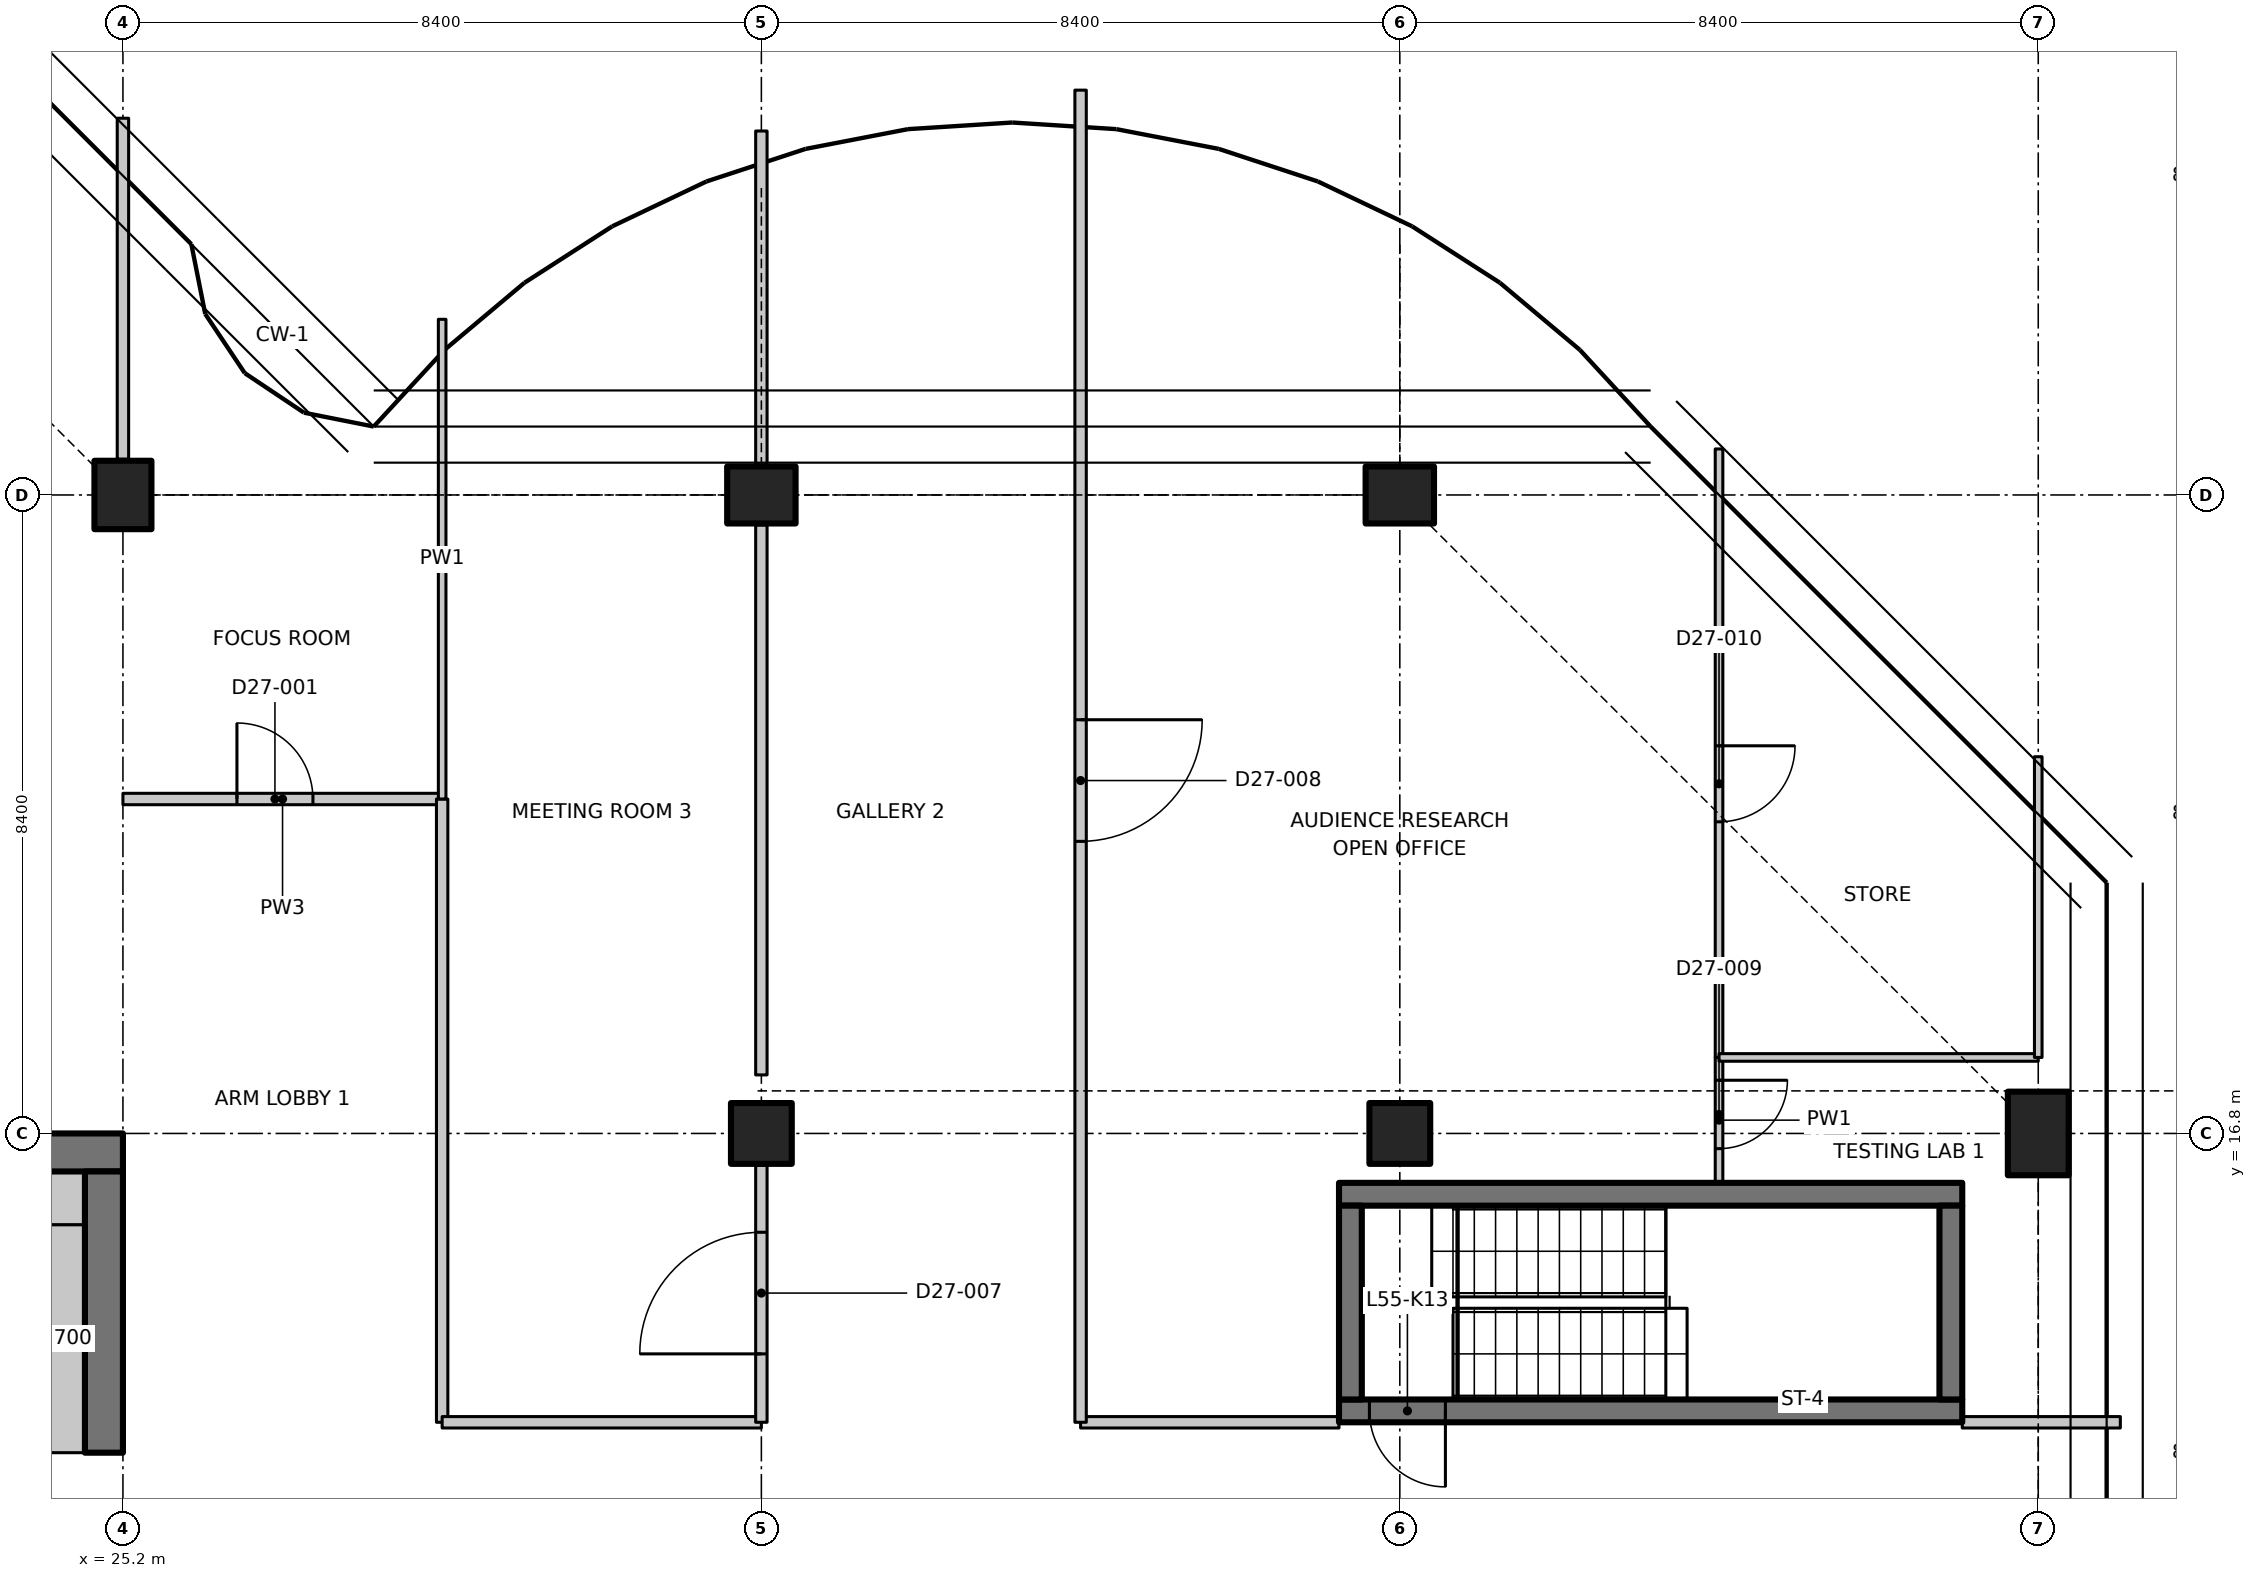
"""IFC4 building model, lengths in metres.
Left out: names, types, materials, properties, quantities, classifications, styles, units other than length and angle.
Written with IfcOpenShell. Run it as: python <this file> out.ifc"""

import sys

from ifc_helpers import new_model, si_unit, direction, frame, frame_2d, origin, origin_2d, place, context, subcontext, project, spatial, polyline, rectangle, outline, extrude, element, fill, save


model = new_model("IFC4")
c1 = context("Model", 3, precision=1e-05, world=origin(), true_north=direction((0.0, 1.0)))
c2 = subcontext(c1, "Body", "Model", "MODEL_VIEW")
j1 = project(units=[si_unit("LENGTHUNIT", "METRE"), si_unit("PLANEANGLEUNIT", "RADIAN")], contexts=[c1])
p1 = place(None, origin())
s1 = spatial("IfcSite", under=j1, at=p1, CompositionType="ELEMENT")
p2 = place(p1, origin())
s2 = spatial("IfcBuilding", under=s1, at=p2, CompositionType="ELEMENT")
p3 = place(p2, frame((0.0, 0.0, 219.3)))
s3 = spatial("IfcBuildingStorey", under=s2, at=p3, CompositionType="ELEMENT", Elevation=219.3)
p4 = place(p3, frame((25.2, 25.2, 0.0), z_axis=(0.0, 0.0, 1.0), x_axis=(1.0, 0.0, 0.0)))
e1 = element("IfcColumn", 1, at=p4, inside=s3, PredefinedType="COLUMN", context=c2, shape_type="SweptSolid", body=[
    extrude(rectangle(XDim=0.75, YDim=0.9, at=origin_2d()), origin(), (0.0, 0.0, 1.0), 3.35),
])
p5 = place(p3, frame((33.6, 16.8, 0.0), z_axis=(0.0, 0.0, 1.0), x_axis=(1.0, 0.0, 0.0)))
e2 = element("IfcColumn", 2, at=p5, inside=s3, PredefinedType="COLUMN", context=c2, shape_type="SweptSolid", body=[
    extrude(rectangle(XDim=0.8, YDim=0.8, at=origin_2d()), origin(), (0.0, 0.0, 1.0), 3.35),
])
p6 = place(p3, frame((33.6, 25.2, 0.0), z_axis=(0.0, 0.0, 1.0), x_axis=(0.0, 1.0, 0.0)))
e3 = element("IfcColumn", 3, at=p6, inside=s3, PredefinedType="COLUMN", context=c2, shape_type="SweptSolid", body=[
    extrude(rectangle(XDim=0.75, YDim=0.9, at=origin_2d()), origin(), (0.0, 0.0, 1.0), 3.35),
])
p7 = place(p3, frame((42.0, 16.8, 0.0), z_axis=(0.0, 0.0, 1.0), x_axis=(1.0, 0.0, 0.0)))
e4 = element("IfcColumn", 4, at=p7, inside=s3, PredefinedType="COLUMN", context=c2, shape_type="SweptSolid", body=[
    extrude(rectangle(XDim=0.8, YDim=0.8, at=origin_2d()), origin(), (0.0, 0.0, 1.0), 3.35),
])
p8 = place(p3, frame((42.0, 25.2, 0.0), z_axis=(0.0, 0.0, 1.0), x_axis=(0.0, 1.0, 0.0)))
e5 = element("IfcColumn", 5, at=p8, inside=s3, PredefinedType="COLUMN", context=c2, shape_type="SweptSolid", body=[
    extrude(rectangle(XDim=0.75, YDim=0.9, at=origin_2d()), origin(), (0.0, 0.0, 1.0), 3.35),
])
p9 = place(p3, frame((50.4, 16.8, 0.0), z_axis=(0.0, 0.0, 1.0), x_axis=(1.0, 0.0, 0.0)))
e6 = element("IfcColumn", 6, at=p9, inside=s3, PredefinedType="COLUMN", context=c2, shape_type="SweptSolid", body=[
    extrude(rectangle(XDim=0.8, YDim=1.1, at=origin_2d()), origin(), (0.0, 0.0, 1.0), 3.35),
])
p10 = place(p3, frame((23.8, 16.55, 0.0), z_axis=(0.0, 0.0, 1.0), x_axis=(1.0, 0.0, 0.0)))
e7 = element("IfcWall", 7, at=p10, inside=s3, PredefinedType="SHEAR", context=c2, shape_type="SweptSolid", body=[
    extrude(rectangle(XDim=1.4, YDim=0.5, at=frame_2d((0.7, 0.0))), origin(), (0.0, 0.0, 1.0), 3.35),
])
p11 = place(p3, frame((24.95, 12.6, 0.0), z_axis=(0.0, 0.0, 1.0), x_axis=(0.0, 1.0, 0.0)))
e8 = element("IfcWall", 8, at=p11, inside=s3, PredefinedType="SHEAR", context=c2, shape_type="SweptSolid", body=[
    extrude(rectangle(XDim=3.7, YDim=0.5, at=frame_2d((1.85, 0.0))), origin(), (0.0, 0.0, 1.0), 3.35),
])
p12 = place(p3, frame((24.35, 12.6, 0.0), z_axis=(0.0, 0.0, 1.0), x_axis=(0.0, 1.0, 0.0)))
e9 = element("IfcWall", 9, at=p12, inside=s3, PredefinedType="PARTITIONING", context=c2, shape_type="SweptSolid", body=[
    extrude(rectangle(XDim=3.0, YDim=0.7, at=frame_2d((1.5, 0.0))), origin(), (0.0, 0.0, 1.0), 3.35),
])
p13 = place(p3, frame((23.8, 15.95, 0.0), z_axis=(0.0, 0.0, 1.0), x_axis=(1.0, 0.0, 0.0)))
e10 = element("IfcWall", 10, at=p13, inside=s3, PredefinedType="PARTITIONING", context=c2, shape_type="SweptSolid", body=[
    extrude(rectangle(XDim=0.9, YDim=0.7, at=frame_2d((0.45, 0.0))), origin(), (0.0, 0.0, 1.0), 3.35),
])
p14 = place(p3, frame((49.4, 13.15, 0.0), z_axis=(0.0, 0.0, 1.0), x_axis=(-1.0, 0.0, 0.0)))
e11 = element("IfcWall", 11, at=p14, inside=s3, PredefinedType="SHEAR", context=c2, shape_type="SweptSolid", body=[
    extrude(rectangle(XDim=8.2, YDim=0.3, at=frame_2d((4.1, 0.0))), origin(), (0.0, 0.0, 1.0), 3.35),
])
p15 = place(p14, frame((6.8, 0.0, 0.0)))
e12 = element("IfcOpeningElement", 12, at=p15, cuts=e11, PredefinedType="OPENING", context=c2, shape_type="SweptSolid", body=[
    extrude(rectangle(XDim=1.0, YDim=2.1, at=frame_2d((0.5, 1.05))), frame((0.0, 0.16, 0.0), z_axis=(0.0, -1.0, 0.0), x_axis=(1.0, 0.0, 0.0)), (0.0, 0.0, 1.0), 0.32),
])
p16 = place(p3, frame((41.2, 16.0, 0.0), z_axis=(0.0, 0.0, 1.0), x_axis=(1.0, 0.0, 0.0)))
e13 = element("IfcWall", 13, at=p16, inside=s3, PredefinedType="SHEAR", context=c2, shape_type="SweptSolid", body=[
    extrude(rectangle(XDim=8.2, YDim=0.3, at=frame_2d((4.1, 0.0))), origin(), (0.0, 0.0, 1.0), 3.35),
])
for number, where, z_axis, x_axis in (
    (14, (41.35, 13.3, 0.0), (0.0, 0.0, 1.0), (0.0, 1.0, 0.0)),
    (15, (49.25, 13.3, 0.0), (0.0, 0.0, 1.0), (0.0, 1.0, 0.0)),
):
    element("IfcWall", number, at=place(p3, frame(where, z_axis=z_axis, x_axis=x_axis)), inside=s3, PredefinedType="SHEAR", context=c2, shape_type="SweptSolid", body=[
        extrude(rectangle(XDim=2.55, YDim=0.3, at=frame_2d((1.275, 0.0))), origin(), (0.0, 0.0, 1.0), 3.35),
    ])
p17 = place(p3, frame((25.2, 21.2, 0.0), z_axis=(0.0, 0.0, 1.0), x_axis=(1.0, 0.0, 0.0)))
e16 = element("IfcWall", 16, at=p17, inside=s3, PredefinedType="PARTITIONING", context=c2, shape_type="SweptSolid", body=[
    extrude(rectangle(XDim=4.2, YDim=0.15, at=frame_2d((2.1, 0.0))), origin(), (0.0, 0.0, 1.0), 3.33),
])
p18 = place(p17, frame((1.5, 0.0, 0.0)))
e17 = element("IfcOpeningElement", 17, at=p18, cuts=e16, PredefinedType="OPENING", context=c2, shape_type="SweptSolid", body=[
    extrude(rectangle(XDim=1.0, YDim=2.1, at=frame_2d((0.5, 1.05))), frame((0.0, 0.085, 0.0), z_axis=(0.0, -1.0, 0.0), x_axis=(1.0, 0.0, 0.0)), (0.0, 0.0, 1.0), 0.17),
])
p19 = place(p3, frame((29.4, 21.2, 0.0), z_axis=(0.0, 0.0, 1.0), x_axis=(0.0, -1.0, 0.0)))
e18 = element("IfcWall", 18, at=p19, inside=s3, PredefinedType="PARTITIONING", context=c2, shape_type="SweptSolid", body=[
    extrude(rectangle(XDim=8.2, YDim=0.15, at=frame_2d((4.1, 0.0))), origin(), (0.0, 0.0, 1.0), 3.33),
])
p20 = place(p3, frame((29.4, 27.511, 0.0), z_axis=(0.0, 0.0, 1.0), x_axis=(0.0, -1.0, 0.0)))
e19 = element("IfcWall", 19, at=p20, inside=s3, PredefinedType="PARTITIONING", context=c2, shape_type="SweptSolid", body=[
    extrude(outline(polyline([(0.0, 0.0), (6.311, 0.0), (6.311, 3.33), (2.761, 3.33), (2.759, 2.98), (1.863, 2.98), (1.861, 3.33), (0.236, 3.33), (0.0, 3.33), (0.0, 0.0)])), frame((0.0, 0.05, 0.0), z_axis=(0.0, -1.0, 0.0), x_axis=(1.0, 0.0, 0.0)), (0.0, 0.0, 1.0), 0.1),
])
p21 = place(p3, frame((25.2, 25.67, 0.0), z_axis=(0.0, 0.0, 1.0), x_axis=(0.0, 1.0, 0.0)))
e20 = element("IfcWall", 20, at=p21, inside=s3, PredefinedType="PARTITIONING", context=c2, shape_type="SweptSolid", body=[
    extrude(rectangle(XDim=4.487, YDim=0.15, at=frame_2d((2.243, 0.0))), origin(), (0.0, 0.0, 1.0), 2.98),
])
p22 = place(p3, frame((29.4, 13.0, 0.0), z_axis=(0.0, 0.0, 1.0), x_axis=(1.0, 0.0, 0.0)))
e21 = element("IfcWall", 21, at=p22, inside=s3, PredefinedType="PARTITIONING", context=c2, shape_type="SweptSolid", body=[
    extrude(rectangle(XDim=4.2, YDim=0.15, at=frame_2d((2.1, 0.0))), origin(), (0.0, 0.0, 1.0), 3.33),
])
p23 = place(p3, frame((37.8, 13.0, 0.0), z_axis=(0.0, 0.0, 1.0), x_axis=(1.0, 0.0, 0.0)))
e22 = element("IfcWall", 22, at=p23, inside=s3, PredefinedType="PARTITIONING", context=c2, shape_type="SweptSolid", body=[
    extrude(rectangle(XDim=3.4, YDim=0.15, at=frame_2d((1.7, 0.0))), origin(), (0.0, 0.0, 1.0), 3.33),
])
p24 = place(p3, frame((49.4, 13.0, 0.0), z_axis=(0.0, 0.0, 1.0), x_axis=(1.0, 0.0, 0.0)))
e23 = element("IfcWall", 23, at=p24, inside=s3, PredefinedType="PARTITIONING", context=c2, shape_type="SweptSolid", body=[
    extrude(rectangle(XDim=2.08, YDim=0.15, at=frame_2d((1.04, 0.0))), origin(), (0.0, 0.0, 1.0), 2.98),
])
p25 = place(p3, frame((33.6, 13.0, 0.0), z_axis=(0.0, 0.0, 1.0), x_axis=(0.0, 1.0, 0.0)))
e24 = element("IfcWall", 24, at=p25, inside=s3, PredefinedType="PARTITIONING", context=c2, shape_type="SweptSolid", body=[
    extrude(rectangle(XDim=3.38, YDim=0.15, at=frame_2d((1.69, 0.0))), origin(), (0.0, 0.0, 1.0), 3.33),
])
p26 = place(p25, frame((0.9, 0.0, 0.0)))
e25 = element("IfcOpeningElement", 25, at=p26, cuts=e24, PredefinedType="OPENING", context=c2, shape_type="SweptSolid", body=[
    extrude(rectangle(XDim=1.6, YDim=2.1, at=frame_2d((0.8, 1.05))), frame((0.0, 0.085, 0.0), z_axis=(0.0, -1.0, 0.0), x_axis=(1.0, 0.0, 0.0)), (0.0, 0.0, 1.0), 0.17),
])
p27 = place(p3, frame((33.6, 17.57, 0.0), z_axis=(0.0, 0.0, 1.0), x_axis=(0.0, 1.0, 0.0)))
e26 = element("IfcWall", 26, at=p27, inside=s3, PredefinedType="PARTITIONING", context=c2, shape_type="SweptSolid", body=[
    extrude(outline(polyline([(0.0, 0.0), (7.235, 0.0), (7.235, 2.98), (7.182, 2.98), (7.18, 3.33), (0.0, 3.33), (0.0, 0.0)])), frame((0.0, 0.075, 0.0), z_axis=(0.0, -1.0, 0.0), x_axis=(1.0, 0.0, 0.0)), (0.0, 0.0, 1.0), 0.15),
])
p28 = place(p3, frame((33.6, 25.595, 0.0), z_axis=(0.0, 0.0, 1.0), x_axis=(0.0, 1.0, 0.0)))
e27 = element("IfcWall", 27, at=p28, inside=s3, PredefinedType="PARTITIONING", context=c2, shape_type="SweptSolid", body=[
    extrude(rectangle(XDim=4.393, YDim=0.15, at=frame_2d((2.197, 0.0))), origin(), (0.0, 0.0, 1.0), 2.98),
])
p29 = place(p3, frame((37.8, 30.526, 0.0), z_axis=(0.0, 0.0, 1.0), x_axis=(0.0, -1.0, 0.0)))
e28 = element("IfcWall", 28, at=p29, inside=s3, PredefinedType="PARTITIONING", context=c2, shape_type="SweptSolid", body=[
    extrude(outline(polyline([(0.0, 0.0), (17.526, 0.0), (17.526, 3.33), (5.776, 3.33), (5.774, 2.98), (4.878, 2.98), (4.876, 3.33), (0.283, 3.33), (0.0, 3.33), (0.0, 0.0)])), frame((0.0, 0.075, 0.0), z_axis=(0.0, -1.0, 0.0), x_axis=(1.0, 0.0, 0.0)), (0.0, 0.0, 1.0), 0.15),
])
p30 = place(p29, frame((8.283, 0.0, 0.0)))
e29 = element("IfcOpeningElement", 29, at=p30, cuts=e28, PredefinedType="OPENING", context=c2, shape_type="SweptSolid", body=[
    extrude(rectangle(XDim=1.6, YDim=2.1, at=frame_2d((0.8, 1.05))), frame((0.0, 0.085, 0.0), z_axis=(0.0, -1.0, 0.0), x_axis=(1.0, 0.0, 0.0)), (0.0, 0.0, 1.0), 0.17),
])
p31 = place(p3, frame((46.2, 17.8, 0.0), z_axis=(0.0, 0.0, 1.0), x_axis=(0.0, -1.0, 0.0)))
e30 = element("IfcWall", 30, at=p31, inside=s3, PredefinedType="PARTITIONING", context=c2, shape_type="SweptSolid", body=[
    extrude(rectangle(XDim=1.65, YDim=0.1, at=frame_2d((0.825, 0.0))), origin(), (0.0, 0.0, 1.0), 2.192),
])
p32 = place(p31, frame((0.3, 0.0, 0.0)))
e31 = element("IfcOpeningElement", 31, at=p32, cuts=e30, PredefinedType="OPENING", context=c2, shape_type="SweptSolid", body=[
    extrude(rectangle(XDim=0.9, YDim=2.1, at=frame_2d((0.45, 1.05))), frame((0.0, 0.06, 0.0), z_axis=(0.0, -1.0, 0.0), x_axis=(1.0, 0.0, 0.0)), (0.0, 0.0, 1.0), 0.12),
])
p33 = place(p3, frame((46.2, 25.805, 0.0), z_axis=(0.0, 0.0, 1.0), x_axis=(0.0, -1.0, 0.0)))
e32 = element("IfcWall", 32, at=p33, inside=s3, PredefinedType="PARTITIONING", context=c2, shape_type="SweptSolid", body=[
    extrude(outline(polyline([(0.0, 0.0), (8.005, 0.0), (8.005, 3.33), (5.471, 3.33), (5.469, 2.98), (4.142, 2.98), (4.14, 3.33), (0.406, 3.33), (0.0, 3.33), (0.0, 0.0)])), frame((0.0, 0.05, 0.0), z_axis=(0.0, -1.0, 0.0), x_axis=(1.0, 0.0, 0.0)), (0.0, 0.0, 1.0), 0.1),
])
p34 = place(p33, frame((3.906, 0.0, 0.0)))
e33 = element("IfcOpeningElement", 33, at=p34, cuts=e32, PredefinedType="OPENING", context=c2, shape_type="SweptSolid", body=[
    extrude(rectangle(XDim=1.0, YDim=2.1, at=frame_2d((0.5, 1.05))), frame((0.0, 0.06, 0.0), z_axis=(0.0, -1.0, 0.0), x_axis=(1.0, 0.0, 0.0)), (0.0, 0.0, 1.0), 0.12),
])
p35 = place(p3, frame((46.2, 17.8, 0.0), z_axis=(0.0, 0.0, 1.0), x_axis=(1.0, 0.0, 0.0)))
e34 = element("IfcWall", 34, at=p35, inside=s3, PredefinedType="PARTITIONING", context=c2, shape_type="SweptSolid", body=[
    extrude(rectangle(XDim=4.2, YDim=0.1, at=frame_2d((2.1, 0.0))), origin(), (0.0, 0.0, 1.0), 2.98),
])
p36 = place(p3, frame((50.4, 17.8, 0.0), z_axis=(0.0, 0.0, 1.0), x_axis=(0.0, 1.0, 0.0)))
e35 = element("IfcWall", 35, at=p36, inside=s3, PredefinedType="PARTITIONING", context=c2, shape_type="SweptSolid", body=[
    extrude(rectangle(XDim=3.956, YDim=0.1, at=frame_2d((1.978, 0.0))), origin(), (0.0, 0.0, 1.0), 3.33),
])
p37 = place(p15, origin())
e36 = element("IfcDoor", 36, at=p37, inside=s3, OperationType="SINGLE_SWING_LEFT", PredefinedType="DOOR", context=c2, shape_type="SweptSolid", body=[
    extrude(rectangle(XDim=1.0, YDim=2.1, at=frame_2d((0.5, 1.05))), frame((0.0, 0.025, 0.0), z_axis=(0.0, -1.0, 0.0), x_axis=(1.0, 0.0, 0.0)), (0.0, 0.0, 1.0), 0.05),
])
fill(e12, e36)
p38 = place(p18, origin())
e37 = element("IfcDoor", 37, at=p38, inside=s3, OperationType="SINGLE_SWING_LEFT", PredefinedType="DOOR", context=c2, shape_type="SweptSolid", body=[
    extrude(rectangle(XDim=1.0, YDim=2.1, at=frame_2d((0.5, 1.05))), frame((0.0, 0.025, 0.0), z_axis=(0.0, -1.0, 0.0), x_axis=(1.0, 0.0, 0.0)), (0.0, 0.0, 1.0), 0.05),
])
fill(e17, e37)
p39 = place(p26, origin())
e38 = element("IfcDoor", 38, at=p39, inside=s3, OperationType="DOUBLE_DOOR_SINGLE_SWING", PredefinedType="DOOR", context=c2, shape_type="SweptSolid", body=[
    extrude(rectangle(XDim=1.6, YDim=2.1, at=frame_2d((0.8, 1.05))), frame((0.0, 0.025, 0.0), z_axis=(0.0, -1.0, 0.0), x_axis=(1.0, 0.0, 0.0)), (0.0, 0.0, 1.0), 0.05),
])
fill(e25, e38)
p40 = place(p30, origin())
e39 = element("IfcDoor", 39, at=p40, inside=s3, OperationType="DOUBLE_DOOR_SINGLE_SWING", PredefinedType="DOOR", context=c2, shape_type="SweptSolid", body=[
    extrude(rectangle(XDim=1.6, YDim=2.1, at=frame_2d((0.8, 1.05))), frame((0.0, 0.025, 0.0), z_axis=(0.0, -1.0, 0.0), x_axis=(1.0, 0.0, 0.0)), (0.0, 0.0, 1.0), 0.05),
])
fill(e29, e39)
p41 = place(p32, origin())
e40 = element("IfcDoor", 40, at=p41, inside=s3, OperationType="SINGLE_SWING_LEFT", PredefinedType="DOOR", context=c2, shape_type="SweptSolid", body=[
    extrude(rectangle(XDim=0.9, YDim=2.1, at=frame_2d((0.45, 1.05))), frame((0.0, 0.025, 0.0), z_axis=(0.0, -1.0, 0.0), x_axis=(1.0, 0.0, 0.0)), (0.0, 0.0, 1.0), 0.05),
])
fill(e31, e40)
p42 = place(p34, origin())
e41 = element("IfcDoor", 41, at=p42, inside=s3, OperationType="SINGLE_SWING_LEFT", PredefinedType="DOOR", context=c2, shape_type="SweptSolid", body=[
    extrude(rectangle(XDim=1.0, YDim=2.1, at=frame_2d((0.5, 1.05))), frame((0.0, 0.025, 0.0), z_axis=(0.0, -1.0, 0.0), x_axis=(1.0, 0.0, 0.0)), (0.0, 0.0, 1.0), 0.05),
])
fill(e33, e41)
save(model, sys.argv[1])
